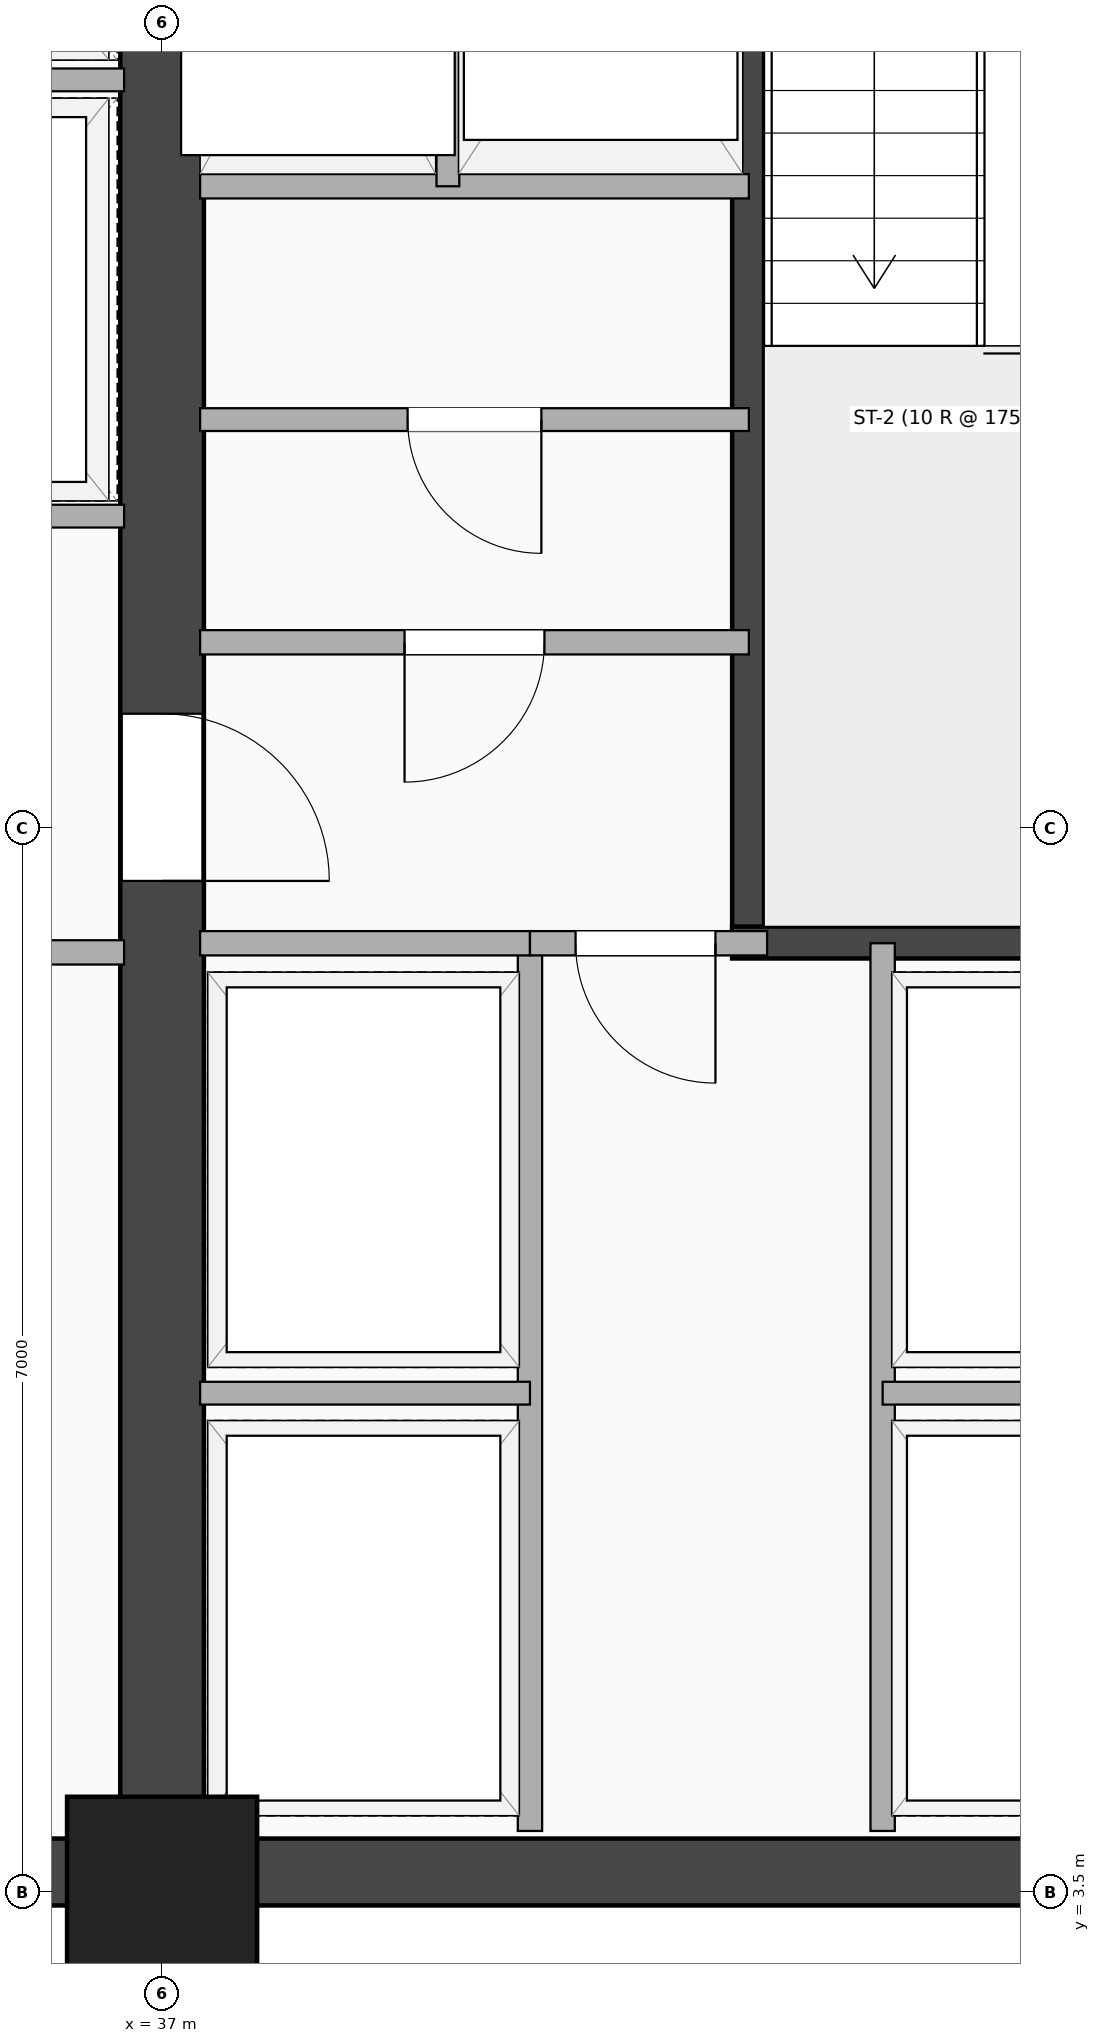
"""IFC4 building model, lengths in metres.
Left out: names, types, materials, properties, quantities, classifications, styles, units other than length and angle.
Written with IfcOpenShell. Run it as: python <this file> out.ifc"""

import sys

from ifc_helpers import new_model, si_unit, direction, frame, frame_2d, origin, origin_2d, place, context, subcontext, project, spatial, rectangle, extrude, element, fill, save


model = new_model("IFC4")
c1 = context("Model", 3, precision=1e-05, world=origin(), true_north=direction((0.0, 1.0)))
c2 = subcontext(c1, "Body", "Model", "MODEL_VIEW")
j1 = project(units=[si_unit("LENGTHUNIT", "METRE"), si_unit("PLANEANGLEUNIT", "RADIAN")], contexts=[c1])
p1 = place(None, origin())
s1 = spatial("IfcSite", under=j1, at=p1, CompositionType="ELEMENT")
p2 = place(p1, origin())
s2 = spatial("IfcBuilding", under=s1, at=p2, CompositionType="ELEMENT")
p3 = place(p2, frame((0.0, 0.0, 112.7)))
s3 = spatial("IfcBuildingStorey", under=s2, at=p3, CompositionType="ELEMENT", Elevation=112.7)
p4 = place(p3, frame((20.3, 3.63, 0.0), z_axis=(0.0, 0.0, 1.0), x_axis=(1.0, 0.0, 0.0)))
e1 = element("IfcWall", 1, at=p4, inside=s3, PredefinedType="SHEAR", context=c2, shape_type="SweptSolid", body=[
    extrude(rectangle(XDim=24.5, YDim=0.44, at=frame_2d((12.25, 0.0))), origin(), (0.0, 0.0, 1.0), 3.24),
])
p5 = place(p3, frame((37.0, 3.5, 0.0), z_axis=(0.0, 0.0, 1.0), x_axis=(0.0, 1.0, 0.0)))
e2 = element("IfcWall", 2, at=p5, inside=s3, PredefinedType="SHEAR", context=c2, shape_type="SweptSolid", body=[
    extrude(rectangle(XDim=16.9, YDim=0.55, at=frame_2d((8.45, 0.0))), origin(), (0.0, 0.0, 1.0), 3.24),
])
p6 = place(p5, frame((6.65, 0.0, 0.0)))
e3 = element("IfcOpeningElement", 3, at=p6, cuts=e2, PredefinedType="OPENING", context=c2, shape_type="SweptSolid", body=[
    extrude(rectangle(XDim=1.1, YDim=2.15, at=frame_2d((0.55, 1.075))), frame((0.0, 0.285, 0.0), z_axis=(0.0, -1.0, 0.0), x_axis=(1.0, 0.0, 0.0)), (0.0, 0.0, 1.0), 0.57),
])
p7 = place(p3, frame((40.855, 9.745, 0.0), z_axis=(0.0, 0.0, 1.0), x_axis=(0.0, 1.0, 0.0)))
e4 = element("IfcWall", 4, at=p7, inside=s3, PredefinedType="SHEAR", context=c2, shape_type="SweptSolid", body=[
    extrude(rectangle(XDim=8.01, YDim=0.21, at=frame_2d((4.005, 0.0))), origin(), (0.0, 0.0, 1.0), 3.24),
])
p8 = place(p3, frame((40.75, 9.745, 0.0), z_axis=(0.0, 0.0, 1.0), x_axis=(1.0, 0.0, 0.0)))
e5 = element("IfcWall", 5, at=p8, inside=s3, PredefinedType="SHEAR", context=c2, shape_type="SweptSolid", body=[
    extrude(rectangle(XDim=3.66, YDim=0.21, at=frame_2d((1.83, 0.0))), origin(), (0.0, 0.0, 1.0), 3.24),
])
p9 = place(p3, frame((37.0, 3.5, -0.26), z_axis=(0.0, 0.0, 1.0), x_axis=(1.0, 0.0, 0.0)))
e6 = element("IfcColumn", 6, at=p9, inside=s3, PredefinedType="COLUMN", context=c2, shape_type="SweptSolid", body=[
    extrude(rectangle(XDim=1.25, YDim=1.25, at=origin_2d()), origin(), (0.0, 0.0, 1.0), 3.5),
])
p10 = place(p3, frame((37.25, 14.72, 0.0), z_axis=(0.0, 0.0, 1.0), x_axis=(1.0, 0.0, 0.0)))
e7 = element("IfcWall", 7, at=p10, inside=s3, PredefinedType="PARTITIONING", context=c2, shape_type="SweptSolid", body=[
    extrude(rectangle(XDim=3.61, YDim=0.16, at=frame_2d((1.805, 0.0))), origin(), (0.0, 0.0, 1.0), 3.24),
])
p11 = place(p3, frame((38.88, 14.72, 0.0), z_axis=(0.0, 0.0, 1.0), x_axis=(0.0, 1.0, 0.0)))
e8 = element("IfcWall", 8, at=p11, inside=s3, PredefinedType="PARTITIONING", context=c2, shape_type="SweptSolid", body=[
    extrude(rectangle(XDim=3.04, YDim=0.15, at=frame_2d((1.52, 0.0))), origin(), (0.0, 0.0, 1.0), 3.24),
])
p12 = place(p3, frame((37.25, 11.72, 0.0), z_axis=(0.0, 0.0, 1.0), x_axis=(1.0, 0.0, 0.0)))
e9 = element("IfcWall", 9, at=p12, inside=s3, PredefinedType="PARTITIONING", context=c2, shape_type="SweptSolid", body=[
    extrude(rectangle(XDim=3.61, YDim=0.16, at=frame_2d((1.805, 0.0))), origin(), (0.0, 0.0, 1.0), 3.24),
])
p13 = place(p12, frame((1.345, 0.0, 0.0)))
e10 = element("IfcOpeningElement", 10, at=p13, cuts=e9, PredefinedType="OPENING", context=c2, shape_type="SweptSolid", body=[
    extrude(rectangle(XDim=0.92, YDim=2.08, at=frame_2d((0.46, 1.04))), frame((0.0, 0.09, 0.0), z_axis=(0.0, -1.0, 0.0), x_axis=(1.0, 0.0, 0.0)), (0.0, 0.0, 1.0), 0.18),
])
p14 = place(p3, frame((37.25, 13.185, 0.0), z_axis=(0.0, 0.0, 1.0), x_axis=(1.0, 0.0, 0.0)))
e11 = element("IfcWall", 11, at=p14, inside=s3, PredefinedType="PARTITIONING", context=c2, shape_type="SweptSolid", body=[
    extrude(rectangle(XDim=3.61, YDim=0.15, at=frame_2d((1.805, 0.0))), origin(), (0.0, 0.0, 1.0), 3.24),
])
p15 = place(p14, frame((1.365, 0.0, 0.0)))
e12 = element("IfcOpeningElement", 12, at=p15, cuts=e11, PredefinedType="OPENING", context=c2, shape_type="SweptSolid", body=[
    extrude(rectangle(XDim=0.88, YDim=2.08, at=frame_2d((0.44, 1.04))), frame((0.0, 0.085, 0.0), z_axis=(0.0, -1.0, 0.0), x_axis=(1.0, 0.0, 0.0)), (0.0, 0.0, 1.0), 0.17),
])
for number, where, z_axis, x_axis in (
    (13, (39.42, 3.9, 0.0), (0.0, 0.0, 1.0), (0.0, 1.0, 0.0)),
    (14, (41.74, 3.9, 0.0), (0.0, 0.0, 1.0), (0.0, 1.0, 0.0)),
):
    element("IfcWall", number, at=place(p3, frame(where, z_axis=z_axis, x_axis=x_axis)), inside=s3, PredefinedType="PARTITIONING", context=c2, shape_type="SweptSolid", body=[
        extrude(rectangle(XDim=5.84, YDim=0.16, at=frame_2d((2.92, 0.0))), origin(), (0.0, 0.0, 1.0), 3.24),
    ])
p16 = place(p3, frame((37.25, 6.78, 0.0), z_axis=(0.0, 0.0, 1.0), x_axis=(1.0, 0.0, 0.0)))
e15 = element("IfcWall", 15, at=p16, inside=s3, PredefinedType="PARTITIONING", context=c2, shape_type="SweptSolid", body=[
    extrude(rectangle(XDim=2.17, YDim=0.15, at=frame_2d((1.085, 0.0))), origin(), (0.0, 0.0, 1.0), 3.24),
])
p17 = place(p3, frame((41.74, 6.78, 0.0), z_axis=(0.0, 0.0, 1.0), x_axis=(1.0, 0.0, 0.0)))
e16 = element("IfcWall", 16, at=p17, inside=s3, PredefinedType="PARTITIONING", context=c2, shape_type="SweptSolid", body=[
    extrude(rectangle(XDim=2.66, YDim=0.15, at=frame_2d((1.33, 0.0))), origin(), (0.0, 0.0, 1.0), 2.313),
])
p18 = place(p3, frame((37.25, 9.74, 0.0), z_axis=(0.0, 0.0, 1.0), x_axis=(1.0, 0.0, 0.0)))
e17 = element("IfcWall", 17, at=p18, inside=s3, PredefinedType="PARTITIONING", context=c2, shape_type="SweptSolid", body=[
    extrude(rectangle(XDim=2.17, YDim=0.16, at=frame_2d((1.085, 0.0))), origin(), (0.0, 0.0, 1.0), 3.24),
])
p19 = place(p3, frame((39.42, 9.74, 0.0), z_axis=(0.0, 0.0, 1.0), x_axis=(1.0, 0.0, 0.0)))
e18 = element("IfcWall", 18, at=p19, inside=s3, PredefinedType="PARTITIONING", context=c2, shape_type="SweptSolid", body=[
    extrude(rectangle(XDim=1.56, YDim=0.16, at=frame_2d((0.78, 0.0))), origin(), (0.0, 0.0, 1.0), 3.24),
])
p20 = place(p19, frame((0.3, 0.0, 0.0)))
e19 = element("IfcOpeningElement", 19, at=p20, cuts=e18, PredefinedType="OPENING", context=c2, shape_type="SweptSolid", body=[
    extrude(rectangle(XDim=0.92, YDim=2.08, at=frame_2d((0.46, 1.04))), frame((0.0, 0.09, 0.0), z_axis=(0.0, -1.0, 0.0), x_axis=(1.0, 0.0, 0.0)), (0.0, 0.0, 1.0), 0.18),
])
p21 = place(p3, frame((32.954, 9.68, 0.0), z_axis=(0.0, 0.0, 1.0), x_axis=(1.0, 0.0, 0.0)))
e20 = element("IfcWall", 20, at=p21, inside=s3, PredefinedType="PARTITIONING", context=c2, shape_type="SweptSolid", body=[
    extrude(rectangle(XDim=3.796, YDim=0.16, at=frame_2d((1.898, 0.0))), origin(), (0.0, 0.0, 1.0), 3.24),
])
p22 = place(p21, frame((2.358, 0.0, 0.0), z_axis=(0.0, 0.0, 1.0), x_axis=(-1.0, 0.0, 0.0)))
e21 = element("IfcOpeningElement", 21, at=p22, cuts=e20, PredefinedType="OPENING", context=c2, shape_type="SweptSolid", body=[
    extrude(rectangle(XDim=0.92, YDim=2.08, at=frame_2d((0.46, 1.04))), frame((0.0, 0.09, 0.0), z_axis=(0.0, -1.0, 0.0), x_axis=(1.0, 0.0, 0.0)), (0.0, 0.0, 1.0), 0.18),
])
for number, where, z_axis, x_axis in (
    (22, (34.48, 12.55, 0.0), (0.0, 0.0, 1.0), (1.0, 0.0, 0.0)),
    (23, (34.48, 15.42, 0.0), (0.0, 0.0, 1.0), (1.0, 0.0, 0.0)),
):
    element("IfcWall", number, at=place(p3, frame(where, z_axis=z_axis, x_axis=x_axis)), inside=s3, PredefinedType="PARTITIONING", context=c2, shape_type="SweptSolid", body=[
        extrude(rectangle(XDim=2.27, YDim=0.15, at=frame_2d((1.135, 0.0))), origin(), (0.0, 0.0, 1.0), 3.24),
    ])
p23 = place(p6, origin())
e24 = element("IfcDoor", 24, at=p23, inside=s3, OperationType="SINGLE_SWING_LEFT", PredefinedType="DOOR", context=c2, shape_type="SweptSolid", body=[
    extrude(rectangle(XDim=1.1, YDim=2.15, at=frame_2d((0.55, 1.075))), frame((0.0, 0.025, 0.0), z_axis=(0.0, -1.0, 0.0), x_axis=(1.0, 0.0, 0.0)), (0.0, 0.0, 1.0), 0.05),
])
fill(e3, e24)
p24 = place(p13, origin())
e25 = element("IfcDoor", 25, at=p24, inside=s3, OperationType="SINGLE_SWING_LEFT", PredefinedType="DOOR", context=c2, shape_type="SweptSolid", body=[
    extrude(rectangle(XDim=0.92, YDim=2.08, at=frame_2d((0.46, 1.04))), frame((0.0, 0.025, 0.0), z_axis=(0.0, -1.0, 0.0), x_axis=(1.0, 0.0, 0.0)), (0.0, 0.0, 1.0), 0.05),
])
fill(e10, e25)
p25 = place(p15, origin())
e26 = element("IfcDoor", 26, at=p25, inside=s3, OperationType="SINGLE_SWING_RIGHT", PredefinedType="DOOR", context=c2, shape_type="SweptSolid", body=[
    extrude(rectangle(XDim=0.88, YDim=2.08, at=frame_2d((0.44, 1.04))), frame((0.0, 0.025, 0.0), z_axis=(0.0, -1.0, 0.0), x_axis=(1.0, 0.0, 0.0)), (0.0, 0.0, 1.0), 0.05),
])
fill(e12, e26)
p26 = place(p20, origin())
e27 = element("IfcDoor", 27, at=p26, inside=s3, OperationType="SINGLE_SWING_RIGHT", PredefinedType="DOOR", context=c2, shape_type="SweptSolid", body=[
    extrude(rectangle(XDim=0.92, YDim=2.08, at=frame_2d((0.46, 1.04))), frame((0.0, 0.025, 0.0), z_axis=(0.0, -1.0, 0.0), x_axis=(1.0, 0.0, 0.0)), (0.0, 0.0, 1.0), 0.05),
])
fill(e19, e27)
save(model, sys.argv[1])
